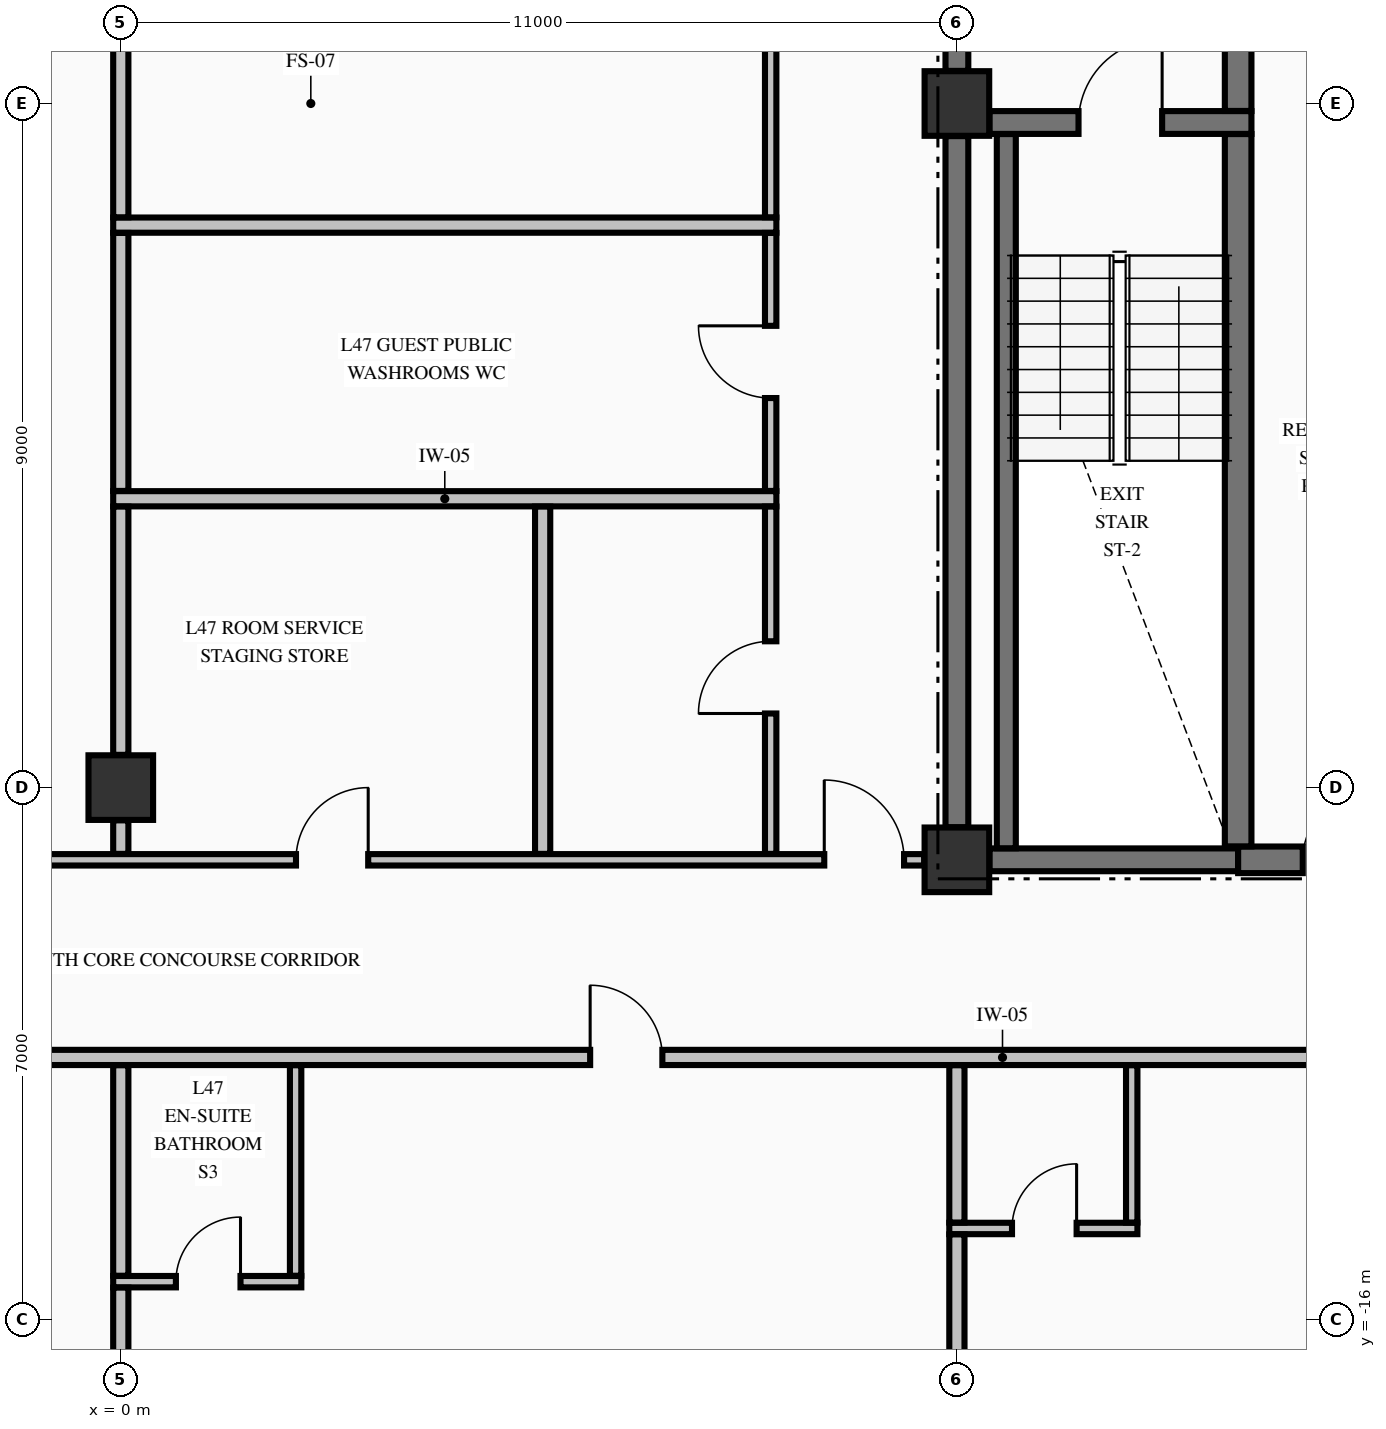
"""IFC4 building model, lengths in metres.
Left out: names, types, materials, properties, quantities, classifications, styles, units other than length and angle.
Written with IfcOpenShell. Run it as: python <this file> out.ifc"""

import sys

from ifc_helpers import new_model, si_unit, direction, frame, frame_2d, origin, origin_2d, place, context, subcontext, project, spatial, rectangle, extrude, element, fill, save


model = new_model("IFC4")
c1 = context("Model", 3, precision=1e-05, world=origin(), true_north=direction((0.0, 1.0)))
c2 = subcontext(c1, "Body", "Model", "MODEL_VIEW")
j1 = project(units=[si_unit("LENGTHUNIT", "METRE"), si_unit("PLANEANGLEUNIT", "RADIAN")], contexts=[c1])
p1 = place(None, origin())
s1 = spatial("IfcSite", under=j1, at=p1, CompositionType="ELEMENT")
p2 = place(p1, origin())
s2 = spatial("IfcBuilding", under=s1, at=p2, CompositionType="ELEMENT")
p3 = place(p2, frame((0.0, 0.0, 183.06)))
s3 = spatial("IfcBuildingStorey", under=s2, at=p3, CompositionType="ELEMENT", Elevation=183.06)
for number, where, z_axis, x_axis in (
    (1, (11.0, -9.95, -0.25), (0.0, 0.0, 1.0), (1.0, 0.0, 0.0)),
    (2, (11.0, 0.0, -0.25), (0.0, 0.0, 1.0), (1.0, 0.0, 0.0)),
    (3, (0.0, -9.0, -0.25), (0.0, 0.0, 1.0), (1.0, 0.0, 0.0)),
):
    element("IfcColumn", number, at=place(p3, frame(where, z_axis=z_axis, x_axis=x_axis)), inside=s3, PredefinedType="COLUMN", context=c2, shape_type="SweptSolid", body=[
        extrude(rectangle(XDim=0.85, YDim=0.85, at=origin_2d()), origin(), (0.0, 0.0, 1.0), 3.225),
    ])
p4 = place(p3, frame((11.429, -9.95, 0.0), z_axis=(0.0, 0.0, 1.0), x_axis=(1.0, 0.0, 0.0)))
e4 = element("IfcWall", 4, at=p4, inside=s3, PredefinedType="SHEAR", context=c2, shape_type="SweptSolid", body=[
    extrude(rectangle(XDim=3.271, YDim=0.3, at=frame_2d((1.635, 0.0))), origin(), (0.0, 0.0, 1.0), 2.975),
])
p5 = place(p3, frame((14.7, -9.95, 0.0), z_axis=(0.0, 0.0, 1.0), x_axis=(1.0, 0.0, 0.0)))
e5 = element("IfcWall", 5, at=p5, inside=s3, PredefinedType="SHEAR", context=c2, shape_type="SweptSolid", body=[
    extrude(rectangle(XDim=4.871, YDim=0.35, at=frame_2d((2.436, 0.0))), origin(), (0.0, 0.0, 1.0), 2.975),
])
p6 = place(p5, frame((0.85, 0.0, 0.0)))
e6 = element("IfcOpeningElement", 6, at=p6, cuts=e5, PredefinedType="OPENING", context=c2, shape_type="SweptSolid", body=[
    extrude(rectangle(XDim=0.9, YDim=2.15, at=frame_2d((0.45, 1.075))), frame((0.0, 0.185, 0.0), z_axis=(0.0, -1.0, 0.0), x_axis=(1.0, 0.0, 0.0)), (0.0, 0.0, 1.0), 0.37),
])
p7 = place(p5, frame((3.4, 0.0, 0.0)))
e7 = element("IfcOpeningElement", 7, at=p7, cuts=e5, PredefinedType="OPENING", context=c2, shape_type="SweptSolid", body=[
    extrude(rectangle(XDim=0.9, YDim=2.15, at=frame_2d((0.45, 1.075))), frame((0.0, 0.185, 0.0), z_axis=(0.0, -1.0, 0.0), x_axis=(1.0, 0.0, 0.0)), (0.0, 0.0, 1.0), 0.37),
])
p8 = place(p3, frame((11.429, -0.25, 0.0), z_axis=(0.0, 0.0, 1.0), x_axis=(1.0, 0.0, 0.0)))
e8 = element("IfcWall", 8, at=p8, inside=s3, PredefinedType="SHEAR", context=c2, shape_type="SweptSolid", body=[
    extrude(rectangle(XDim=3.446, YDim=0.3, at=frame_2d((1.723, 0.0))), origin(), (0.0, 0.0, 1.0), 2.975),
])
p9 = place(p8, frame((1.171, 0.0, 0.0)))
e9 = element("IfcOpeningElement", 9, at=p9, cuts=e8, PredefinedType="OPENING", context=c2, shape_type="SweptSolid", body=[
    extrude(rectangle(XDim=1.1, YDim=2.15, at=frame_2d((0.55, 1.075))), frame((0.0, 0.16, 0.0), z_axis=(0.0, -1.0, 0.0), x_axis=(1.0, 0.0, 0.0)), (0.0, 0.0, 1.0), 0.32),
])
p10 = place(p3, frame((-0.1, -15.5, 0.0), z_axis=(0.0, 0.0, 1.0), x_axis=(1.0, 0.0, 0.0)))
e10 = element("IfcWall", 10, at=p10, inside=s3, PredefinedType="PARTITIONING", context=c2, shape_type="SweptSolid", body=[
    extrude(rectangle(XDim=2.475, YDim=0.15, at=frame_2d((1.238, 0.0))), origin(), (0.0, 0.0, 1.0), 2.975),
])
p11 = place(p10, frame((0.825, 0.0, 0.0)))
e11 = element("IfcOpeningElement", 11, at=p11, cuts=e10, PredefinedType="OPENING", context=c2, shape_type="SweptSolid", body=[
    extrude(rectangle(XDim=0.85, YDim=2.1, at=frame_2d((0.425, 1.05))), frame((0.0, 0.085, 0.0), z_axis=(0.0, -1.0, 0.0), x_axis=(1.0, 0.0, 0.0)), (0.0, 0.0, 1.0), 0.17),
])
p12 = place(p3, frame((10.9, -14.8, 0.0), z_axis=(0.0, 0.0, 1.0), x_axis=(1.0, 0.0, 0.0)))
e12 = element("IfcWall", 12, at=p12, inside=s3, PredefinedType="PARTITIONING", context=c2, shape_type="SweptSolid", body=[
    extrude(rectangle(XDim=2.475, YDim=0.15, at=frame_2d((1.238, 0.0))), origin(), (0.0, 0.0, 1.0), 2.975),
])
p13 = place(p12, frame((0.825, 0.0, 0.0)))
e13 = element("IfcOpeningElement", 13, at=p13, cuts=e12, PredefinedType="OPENING", context=c2, shape_type="SweptSolid", body=[
    extrude(rectangle(XDim=0.85, YDim=2.1, at=frame_2d((0.425, 1.05))), frame((0.0, 0.085, 0.0), z_axis=(0.0, -1.0, 0.0), x_axis=(1.0, 0.0, 0.0)), (0.0, 0.0, 1.0), 0.17),
])
p14 = place(p3, frame((-17.1, -12.55, 0.0), z_axis=(0.0, 0.0, 1.0), x_axis=(1.0, 0.0, 0.0)))
e14 = element("IfcWall", 14, at=p14, inside=s3, PredefinedType="PARTITIONING", context=c2, shape_type="SweptSolid", body=[
    extrude(rectangle(XDim=39.2, YDim=0.2, at=frame_2d((19.6, 0.0))), origin(), (0.0, 0.0, 1.0), 2.975),
])
p15 = place(p14, frame((6.475, 0.0, 0.0)))
e15 = element("IfcOpeningElement", 15, at=p15, cuts=e14, PredefinedType="OPENING", context=c2, shape_type="SweptSolid", body=[
    extrude(rectangle(XDim=0.95, YDim=2.15, at=frame_2d((0.475, 1.075))), frame((0.0, 0.11, 0.0), z_axis=(0.0, -1.0, 0.0), x_axis=(1.0, 0.0, 0.0)), (0.0, 0.0, 1.0), 0.22),
])
p16 = place(p14, frame((13.525, 0.0, 0.0)))
e16 = element("IfcOpeningElement", 16, at=p16, cuts=e14, PredefinedType="OPENING", context=c2, shape_type="SweptSolid", body=[
    extrude(rectangle(XDim=0.95, YDim=2.15, at=frame_2d((0.475, 1.075))), frame((0.0, 0.11, 0.0), z_axis=(0.0, -1.0, 0.0), x_axis=(1.0, 0.0, 0.0)), (0.0, 0.0, 1.0), 0.22),
])
p17 = place(p14, frame((23.275, 0.0, 0.0)))
e17 = element("IfcOpeningElement", 17, at=p17, cuts=e14, PredefinedType="OPENING", context=c2, shape_type="SweptSolid", body=[
    extrude(rectangle(XDim=0.95, YDim=2.15, at=frame_2d((0.475, 1.075))), frame((0.0, 0.11, 0.0), z_axis=(0.0, -1.0, 0.0), x_axis=(1.0, 0.0, 0.0)), (0.0, 0.0, 1.0), 0.22),
])
p18 = place(p14, frame((33.175, 0.0, 0.0)))
e18 = element("IfcOpeningElement", 18, at=p18, cuts=e14, PredefinedType="OPENING", context=c2, shape_type="SweptSolid", body=[
    extrude(rectangle(XDim=0.95, YDim=2.15, at=frame_2d((0.475, 1.075))), frame((0.0, 0.11, 0.0), z_axis=(0.0, -1.0, 0.0), x_axis=(1.0, 0.0, 0.0)), (0.0, 0.0, 1.0), 0.22),
])
p19 = place(p3, frame((-10.569, -9.95, 0.0), z_axis=(0.0, 0.0, 1.0), x_axis=(1.0, 0.0, 0.0)))
e19 = element("IfcWall", 19, at=p19, inside=s3, PredefinedType="PARTITIONING", context=c2, shape_type="SweptSolid", body=[
    extrude(rectangle(XDim=21.138, YDim=0.15, at=frame_2d((10.569, 0.0))), origin(), (0.0, 0.0, 1.0), 2.975),
])
p20 = place(p19, frame((0.264, 0.0, 0.0)))
e20 = element("IfcOpeningElement", 20, at=p20, cuts=e19, PredefinedType="OPENING", context=c2, shape_type="SweptSolid", body=[
    extrude(rectangle(XDim=1.05, YDim=2.15, at=frame_2d((0.525, 1.075))), frame((0.0, 0.085, 0.0), z_axis=(0.0, -1.0, 0.0), x_axis=(1.0, 0.0, 0.0)), (0.0, 0.0, 1.0), 0.17),
])
p21 = place(p19, frame((19.824, 0.0, 0.0)))
e21 = element("IfcOpeningElement", 21, at=p21, cuts=e19, PredefinedType="OPENING", context=c2, shape_type="SweptSolid", body=[
    extrude(rectangle(XDim=1.05, YDim=2.15, at=frame_2d((0.525, 1.075))), frame((0.0, 0.085, 0.0), z_axis=(0.0, -1.0, 0.0), x_axis=(1.0, 0.0, 0.0)), (0.0, 0.0, 1.0), 0.17),
])
p22 = place(p19, frame((12.874, 0.0, 0.0)))
e22 = element("IfcOpeningElement", 22, at=p22, cuts=e19, PredefinedType="OPENING", context=c2, shape_type="SweptSolid", body=[
    extrude(rectangle(XDim=0.95, YDim=2.15, at=frame_2d((0.475, 1.075))), frame((0.0, 0.085, 0.0), z_axis=(0.0, -1.0, 0.0), x_axis=(1.0, 0.0, 0.0)), (0.0, 0.0, 1.0), 0.17),
])
for number, where, z_axis, x_axis in (
    (23, (-0.1, -5.2, 0.0), (0.0, 0.0, 1.0), (1.0, 0.0, 0.0)),
    (24, (-0.1, -1.6, 0.0), (0.0, 0.0, 1.0), (1.0, 0.0, 0.0)),
):
    element("IfcWall", number, at=place(p3, frame(where, z_axis=z_axis, x_axis=x_axis)), inside=s3, PredefinedType="PARTITIONING", context=c2, shape_type="SweptSolid", body=[
        extrude(rectangle(XDim=8.725, YDim=0.2, at=frame_2d((4.363, 0.0))), origin(), (0.0, 0.0, 1.0), 2.975),
    ])
p23 = place(p3, frame((11.0, -9.521, 0.0), z_axis=(0.0, 0.0, 1.0), x_axis=(0.0, 1.0, 0.0)))
e25 = element("IfcWall", 25, at=p23, inside=s3, PredefinedType="SHEAR", context=c2, shape_type="SweptSolid", body=[
    extrude(rectangle(XDim=9.092, YDim=0.3, at=frame_2d((4.546, 0.0))), origin(), (0.0, 0.0, 1.0), 2.975),
])
p24 = place(p3, frame((11.0, 0.429, 0.0), z_axis=(0.0, 0.0, 1.0), x_axis=(0.0, 1.0, 0.0)))
e26 = element("IfcWall", 26, at=p24, inside=s3, PredefinedType="SHEAR", context=c2, shape_type="SweptSolid", body=[
    extrude(rectangle(XDim=2.319, YDim=0.3, at=frame_2d((1.16, 0.0))), origin(), (0.0, 0.0, 1.0), 2.975),
])
p25 = place(p24, frame((0.671, 0.0, 0.0)))
e27 = element("IfcOpeningElement", 27, at=p25, cuts=e26, PredefinedType="OPENING", context=c2, shape_type="SweptSolid", body=[
    extrude(rectangle(XDim=1.1, YDim=2.15, at=frame_2d((0.55, 1.075))), frame((0.0, 0.16, 0.0), z_axis=(0.0, -1.0, 0.0), x_axis=(1.0, 0.0, 0.0)), (0.0, 0.0, 1.0), 0.32),
])
p26 = place(p3, frame((11.65, -9.798, 0.0), z_axis=(0.0, 0.0, 1.0), x_axis=(0.0, 1.0, 0.0)))
e28 = element("IfcWall", 28, at=p26, inside=s3, PredefinedType="SOLIDWALL", context=c2, shape_type="SweptSolid", body=[
    extrude(rectangle(XDim=9.396, YDim=0.25, at=frame_2d((4.698, 0.0))), origin(), (0.0, 0.0, 1.0), 2.975),
])
p27 = place(p3, frame((14.7, -9.773, 0.0), z_axis=(0.0, 0.0, 1.0), x_axis=(0.0, 1.0, 0.0)))
e29 = element("IfcWall", 29, at=p27, inside=s3, PredefinedType="SHEAR", context=c2, shape_type="SweptSolid", body=[
    extrude(rectangle(XDim=9.371, YDim=0.35, at=frame_2d((4.686, 0.0))), origin(), (0.0, 0.0, 1.0), 2.975),
])
p28 = place(p3, frame((14.7, -0.098, 0.0), z_axis=(0.0, 0.0, 1.0), x_axis=(0.0, 1.0, 0.0)))
e30 = element("IfcWall", 30, at=p28, inside=s3, PredefinedType="SHEAR", context=c2, shape_type="SweptSolid", body=[
    extrude(rectangle(XDim=2.846, YDim=0.35, at=frame_2d((1.423, 0.0))), origin(), (0.0, 0.0, 1.0), 2.975),
])
p29 = place(p3, frame((0.0, -23.994, 0.0), z_axis=(0.0, 0.0, 1.0), x_axis=(0.0, 1.0, 0.0)))
e31 = element("IfcWall", 31, at=p29, inside=s3, PredefinedType="PARTITIONING", context=c2, shape_type="SweptSolid", body=[
    extrude(rectangle(XDim=8.416, YDim=0.2, at=frame_2d((4.208, 0.0))), origin(), (0.0, 0.0, 1.0), 2.167),
])
p30 = place(p3, frame((0.0, -15.422, 0.0), z_axis=(0.0, 0.0, 1.0), x_axis=(0.0, 1.0, 0.0)))
e32 = element("IfcWall", 32, at=p30, inside=s3, PredefinedType="PARTITIONING", context=c2, shape_type="SweptSolid", body=[
    extrude(rectangle(XDim=2.769, YDim=0.2, at=frame_2d((1.385, 0.0))), origin(), (0.0, 0.0, 1.0), 2.167),
])
p31 = place(p3, frame((0.0, -9.872, 0.0), z_axis=(0.0, 0.0, 1.0), x_axis=(0.0, 1.0, 0.0)))
e33 = element("IfcWall", 33, at=p31, inside=s3, PredefinedType="PARTITIONING", context=c2, shape_type="SweptSolid", body=[
    extrude(rectangle(XDim=0.441, YDim=0.2, at=frame_2d((0.221, 0.0))), origin(), (0.0, 0.0, 1.0), 2.167),
])
p32 = place(p3, frame((0.0, -8.569, 0.0), z_axis=(0.0, 0.0, 1.0), x_axis=(0.0, 1.0, 0.0)))
e34 = element("IfcWall", 34, at=p32, inside=s3, PredefinedType="PARTITIONING", context=c2, shape_type="SweptSolid", body=[
    extrude(rectangle(XDim=3.266, YDim=0.2, at=frame_2d((1.633, 0.0))), origin(), (0.0, 0.0, 1.0), 2.167),
])
p33 = place(p3, frame((0.0, -5.097, 0.0), z_axis=(0.0, 0.0, 1.0), x_axis=(0.0, 1.0, 0.0)))
e35 = element("IfcWall", 35, at=p33, inside=s3, PredefinedType="PARTITIONING", context=c2, shape_type="SweptSolid", body=[
    extrude(rectangle(XDim=3.394, YDim=0.2, at=frame_2d((1.697, 0.0))), origin(), (0.0, 0.0, 1.0), 2.167),
])
p34 = place(p3, frame((0.0, -1.497, 0.0), z_axis=(0.0, 0.0, 1.0), x_axis=(0.0, 1.0, 0.0)))
e36 = element("IfcWall", 36, at=p34, inside=s3, PredefinedType="PARTITIONING", context=c2, shape_type="SweptSolid", body=[
    extrude(rectangle(XDim=4.594, YDim=0.2, at=frame_2d((2.297, 0.0))), origin(), (0.0, 0.0, 1.0), 2.167),
])
p35 = place(p3, frame((2.3, -15.422, 0.0), z_axis=(0.0, 0.0, 1.0), x_axis=(0.0, 1.0, 0.0)))
e37 = element("IfcWall", 37, at=p35, inside=s3, PredefinedType="PARTITIONING", context=c2, shape_type="SweptSolid", body=[
    extrude(rectangle(XDim=2.769, YDim=0.15, at=frame_2d((1.385, 0.0))), origin(), (0.0, 0.0, 1.0), 2.975),
])
p36 = place(p3, frame((5.55, -9.872, 0.0), z_axis=(0.0, 0.0, 1.0), x_axis=(0.0, 1.0, 0.0)))
e38 = element("IfcWall", 38, at=p36, inside=s3, PredefinedType="PARTITIONING", context=c2, shape_type="SweptSolid", body=[
    extrude(rectangle(XDim=4.569, YDim=0.2, at=frame_2d((2.285, 0.0))), origin(), (0.0, 0.0, 1.0), 2.975),
])
p37 = place(p3, frame((8.55, -9.872, 0.0), z_axis=(0.0, 0.0, 1.0), x_axis=(0.0, 1.0, 0.0)))
e39 = element("IfcWall", 39, at=p37, inside=s3, PredefinedType="PARTITIONING", context=c2, shape_type="SweptSolid", body=[
    extrude(rectangle(XDim=4.569, YDim=0.15, at=frame_2d((2.285, 0.0))), origin(), (0.0, 0.0, 1.0), 2.975),
])
p38 = place(p37, frame((1.847, 0.0, 0.0)))
e40 = element("IfcOpeningElement", 40, at=p38, cuts=e39, PredefinedType="OPENING", context=c2, shape_type="SweptSolid", body=[
    extrude(rectangle(XDim=0.95, YDim=2.15, at=frame_2d((0.475, 1.075))), frame((0.0, 0.085, 0.0), z_axis=(0.0, -1.0, 0.0), x_axis=(1.0, 0.0, 0.0)), (0.0, 0.0, 1.0), 0.17),
])
p39 = place(p3, frame((8.55, -5.097, 0.0), z_axis=(0.0, 0.0, 1.0), x_axis=(0.0, 1.0, 0.0)))
e41 = element("IfcWall", 41, at=p39, inside=s3, PredefinedType="PARTITIONING", context=c2, shape_type="SweptSolid", body=[
    extrude(rectangle(XDim=3.394, YDim=0.15, at=frame_2d((1.697, 0.0))), origin(), (0.0, 0.0, 1.0), 2.975),
])
p40 = place(p39, frame((1.222, 0.0, 0.0)))
e42 = element("IfcOpeningElement", 42, at=p40, cuts=e41, PredefinedType="OPENING", context=c2, shape_type="SweptSolid", body=[
    extrude(rectangle(XDim=0.95, YDim=2.15, at=frame_2d((0.475, 1.075))), frame((0.0, 0.085, 0.0), z_axis=(0.0, -1.0, 0.0), x_axis=(1.0, 0.0, 0.0)), (0.0, 0.0, 1.0), 0.17),
])
p41 = place(p3, frame((8.55, -1.497, 0.0), z_axis=(0.0, 0.0, 1.0), x_axis=(0.0, 1.0, 0.0)))
e43 = element("IfcWall", 43, at=p41, inside=s3, PredefinedType="PARTITIONING", context=c2, shape_type="SweptSolid", body=[
    extrude(rectangle(XDim=11.919, YDim=0.15, at=frame_2d((5.959, 0.0))), origin(), (0.0, 0.0, 1.0), 2.975),
])
p42 = place(p41, frame((5.397, 0.0, 0.0)))
e44 = element("IfcOpeningElement", 44, at=p42, cuts=e43, PredefinedType="OPENING", context=c2, shape_type="SweptSolid", body=[
    extrude(rectangle(XDim=1.1, YDim=2.15, at=frame_2d((0.55, 1.075))), frame((0.0, 0.085, 0.0), z_axis=(0.0, -1.0, 0.0), x_axis=(1.0, 0.0, 0.0)), (0.0, 0.0, 1.0), 0.17),
])
p43 = place(p3, frame((11.0, -23.994, 0.0), z_axis=(0.0, 0.0, 1.0), x_axis=(0.0, 1.0, 0.0)))
e45 = element("IfcWall", 45, at=p43, inside=s3, PredefinedType="PARTITIONING", context=c2, shape_type="SweptSolid", body=[
    extrude(rectangle(XDim=9.116, YDim=0.2, at=frame_2d((4.558, 0.0))), origin(), (0.0, 0.0, 1.0), 2.167),
])
p44 = place(p3, frame((11.0, -14.722, 0.0), z_axis=(0.0, 0.0, 1.0), x_axis=(0.0, 1.0, 0.0)))
e46 = element("IfcWall", 46, at=p44, inside=s3, PredefinedType="PARTITIONING", context=c2, shape_type="SweptSolid", body=[
    extrude(rectangle(XDim=2.069, YDim=0.2, at=frame_2d((1.034, 0.0))), origin(), (0.0, 0.0, 1.0), 2.167),
])
p45 = place(p3, frame((13.3, -14.722, 0.0), z_axis=(0.0, 0.0, 1.0), x_axis=(0.0, 1.0, 0.0)))
e47 = element("IfcWall", 47, at=p45, inside=s3, PredefinedType="PARTITIONING", context=c2, shape_type="SweptSolid", body=[
    extrude(rectangle(XDim=2.069, YDim=0.15, at=frame_2d((1.034, 0.0))), origin(), (0.0, 0.0, 1.0), 2.975),
])
p46 = place(p9, origin())
e48 = element("IfcDoor", 48, at=p46, inside=s3, OperationType="SINGLE_SWING_RIGHT", PredefinedType="DOOR", context=c2, shape_type="SweptSolid", body=[
    extrude(rectangle(XDim=1.1, YDim=2.15, at=frame_2d((0.55, 1.075))), frame((0.0, 0.025, 0.0), z_axis=(0.0, -1.0, 0.0), x_axis=(1.0, 0.0, 0.0)), (0.0, 0.0, 1.0), 0.05),
])
fill(e9, e48)
p47 = place(p6, origin())
e49 = element("IfcDoor", 49, at=p47, inside=s3, OperationType="SINGLE_SWING_RIGHT", PredefinedType="DOOR", context=c2, shape_type="SweptSolid", body=[
    extrude(rectangle(XDim=0.9, YDim=2.15, at=frame_2d((0.45, 1.075))), frame((0.0, 0.025, 0.0), z_axis=(0.0, -1.0, 0.0), x_axis=(1.0, 0.0, 0.0)), (0.0, 0.0, 1.0), 0.05),
])
fill(e6, e49)
p48 = place(p21, origin())
e50 = element("IfcDoor", 50, at=p48, inside=s3, OperationType="SINGLE_SWING_LEFT", PredefinedType="DOOR", context=c2, shape_type="SweptSolid", body=[
    extrude(rectangle(XDim=1.05, YDim=2.15, at=frame_2d((0.525, 1.075))), frame((0.0, 0.025, 0.0), z_axis=(0.0, -1.0, 0.0), x_axis=(1.0, 0.0, 0.0)), (0.0, 0.0, 1.0), 0.05),
])
fill(e21, e50)
p49 = place(p17, origin())
e51 = element("IfcDoor", 51, at=p49, inside=s3, OperationType="SINGLE_SWING_LEFT", PredefinedType="DOOR", context=c2, shape_type="SweptSolid", body=[
    extrude(rectangle(XDim=0.95, YDim=2.15, at=frame_2d((0.475, 1.075))), frame((0.0, 0.025, 0.0), z_axis=(0.0, -1.0, 0.0), x_axis=(1.0, 0.0, 0.0)), (0.0, 0.0, 1.0), 0.05),
])
fill(e17, e51)
p50 = place(p11, origin())
e52 = element("IfcDoor", 52, at=p50, inside=s3, OperationType="SINGLE_SWING_RIGHT", PredefinedType="DOOR", context=c2, shape_type="SweptSolid", body=[
    extrude(rectangle(XDim=0.85, YDim=2.1, at=frame_2d((0.425, 1.05))), frame((0.0, 0.025, 0.0), z_axis=(0.0, -1.0, 0.0), x_axis=(1.0, 0.0, 0.0)), (0.0, 0.0, 1.0), 0.05),
])
fill(e11, e52)
p51 = place(p13, origin())
e53 = element("IfcDoor", 53, at=p51, inside=s3, OperationType="SINGLE_SWING_RIGHT", PredefinedType="DOOR", context=c2, shape_type="SweptSolid", body=[
    extrude(rectangle(XDim=0.85, YDim=2.1, at=frame_2d((0.425, 1.05))), frame((0.0, 0.025, 0.0), z_axis=(0.0, -1.0, 0.0), x_axis=(1.0, 0.0, 0.0)), (0.0, 0.0, 1.0), 0.05),
])
fill(e13, e53)
p52 = place(p40, origin())
e54 = element("IfcDoor", 54, at=p52, inside=s3, OperationType="SINGLE_SWING_RIGHT", PredefinedType="DOOR", context=c2, shape_type="SweptSolid", body=[
    extrude(rectangle(XDim=0.95, YDim=2.15, at=frame_2d((0.475, 1.075))), frame((0.0, 0.025, 0.0), z_axis=(0.0, -1.0, 0.0), x_axis=(1.0, 0.0, 0.0)), (0.0, 0.0, 1.0), 0.05),
])
fill(e42, e54)
p53 = place(p38, origin())
e55 = element("IfcDoor", 55, at=p53, inside=s3, OperationType="SINGLE_SWING_LEFT", PredefinedType="DOOR", context=c2, shape_type="SweptSolid", body=[
    extrude(rectangle(XDim=0.95, YDim=2.15, at=frame_2d((0.475, 1.075))), frame((0.0, 0.025, 0.0), z_axis=(0.0, -1.0, 0.0), x_axis=(1.0, 0.0, 0.0)), (0.0, 0.0, 1.0), 0.05),
])
fill(e40, e55)
p54 = place(p22, origin())
e56 = element("IfcDoor", 56, at=p54, inside=s3, OperationType="SINGLE_SWING_RIGHT", PredefinedType="DOOR", context=c2, shape_type="SweptSolid", body=[
    extrude(rectangle(XDim=0.95, YDim=2.15, at=frame_2d((0.475, 1.075))), frame((0.0, 0.025, 0.0), z_axis=(0.0, -1.0, 0.0), x_axis=(1.0, 0.0, 0.0)), (0.0, 0.0, 1.0), 0.05),
])
fill(e22, e56)
save(model, sys.argv[1])
